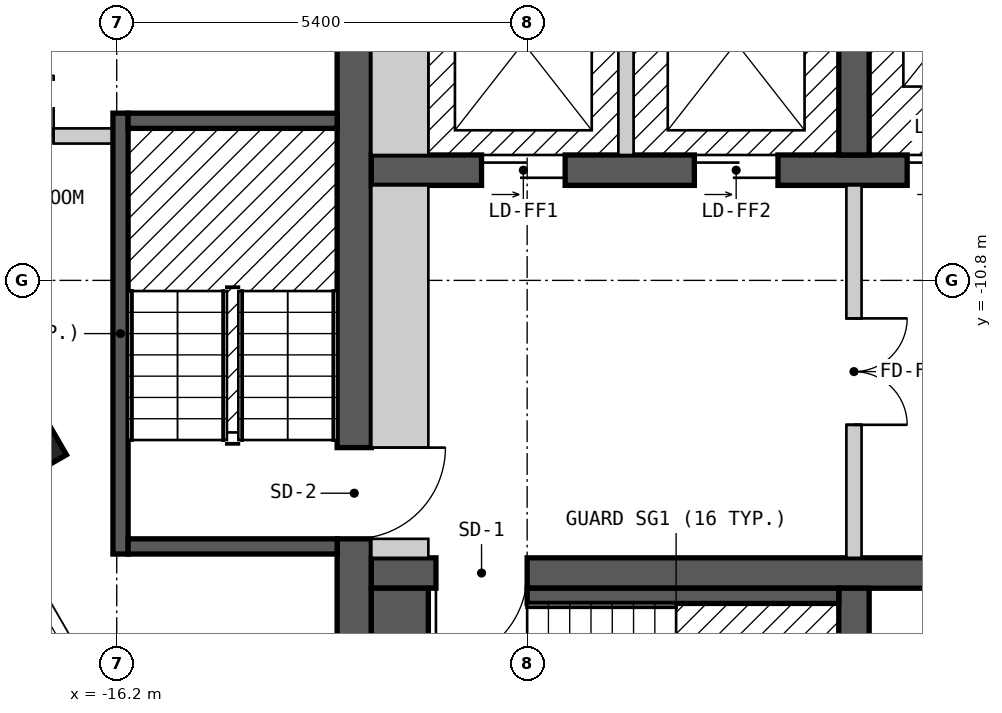
"""IFC4 building model, lengths in metres.
Left out: names, types, materials, properties, quantities, classifications, styles, units other than length and angle.
Written with IfcOpenShell. Run it as: python <this file> out.ifc"""

import sys

from ifc_helpers import new_model, si_unit, direction, frame, frame_2d, origin, origin_2d, place, context, subcontext, project, spatial, polyline, rectangle, outline, extrude, element, fill, save


model = new_model("IFC4")
c1 = context("Model", 3, precision=1e-05, world=origin(), true_north=direction((0.0, 1.0)))
c2 = subcontext(c1, "Body", "Model", "MODEL_VIEW")
j1 = project(units=[si_unit("LENGTHUNIT", "METRE"), si_unit("PLANEANGLEUNIT", "RADIAN")], contexts=[c1])
p1 = place(None, origin())
s1 = spatial("IfcSite", under=j1, at=p1, CompositionType="ELEMENT")
p2 = place(p1, origin())
s2 = spatial("IfcBuilding", under=s1, at=p2, CompositionType="ELEMENT")
p3 = place(p2, frame((0.0, 0.0, 223.8)))
s3 = spatial("IfcBuildingStorey", under=s2, at=p3, CompositionType="ELEMENT", Elevation=223.8)
p4 = place(p3, frame((-17.34, -12.966, 0.0), z_axis=(0.0, 0.0, 1.0), x_axis=(0.499984884929, -0.866034130299, 0.0)))
e1 = element("IfcColumn", 1, at=p4, inside=s3, PredefinedType="COLUMN", context=c2, shape_type="SweptSolid", body=[
    extrude(rectangle(XDim=0.7, YDim=0.7, at=origin_2d()), origin(), (0.0, 0.0, 1.0), 3.0),
])
p5 = place(p3, frame((-13.075, -18.55, 0.0), z_axis=(0.0, 0.0, 1.0), x_axis=(0.0, 1.0, 0.0)))
e2 = element("IfcWall", 2, at=p5, inside=s3, PredefinedType="SHEAR", context=c2, shape_type="SweptSolid", body=[
    extrude(rectangle(XDim=13.1, YDim=0.45, at=frame_2d((6.55, 0.0))), origin(), (0.0, 0.0, 1.0), 2.7),
])
p6 = place(p5, frame((4.35, 0.0, 0.0)))
e3 = element("IfcOpeningElement", 3, at=p6, cuts=e2, PredefinedType="OPENING", context=c2, shape_type="SweptSolid", body=[
    extrude(rectangle(XDim=1.2, YDim=2.1, at=frame_2d((0.6, 1.05))), frame((0.0, 0.235, 0.0), z_axis=(0.0, -1.0, 0.0), x_axis=(1.0, 0.0, 0.0)), (0.0, 0.0, 1.0), 0.47),
])
p7 = place(p3, frame((-12.85, -14.65, 0.0), z_axis=(0.0, 0.0, 1.0), x_axis=(1.0, 0.0, 0.0)))
e4 = element("IfcWall", 4, at=p7, inside=s3, PredefinedType="SHEAR", context=c2, shape_type="SweptSolid", body=[
    extrude(rectangle(XDim=25.7, YDim=0.4, at=frame_2d((12.85, 0.0))), origin(), (0.0, 0.0, 1.0), 2.7),
])
p8 = place(p7, frame((2.05, 0.0, 0.0), z_axis=(0.0, 0.0, 1.0), x_axis=(-1.0, 0.0, 0.0)))
e5 = element("IfcOpeningElement", 5, at=p8, cuts=e4, PredefinedType="OPENING", context=c2, shape_type="SweptSolid", body=[
    extrude(rectangle(XDim=1.2, YDim=2.1, at=frame_2d((0.6, 1.05))), frame((0.0, 0.21, 0.0), z_axis=(0.0, -1.0, 0.0), x_axis=(1.0, 0.0, 0.0)), (0.0, 0.0, 1.0), 0.42),
])
p9 = place(p7, frame((24.9, 0.0, 0.0), z_axis=(0.0, 0.0, 1.0), x_axis=(-1.0, 0.0, 0.0)))
e6 = element("IfcOpeningElement", 6, at=p9, cuts=e4, PredefinedType="OPENING", context=c2, shape_type="SweptSolid", body=[
    extrude(rectangle(XDim=1.2, YDim=2.1, at=frame_2d((0.6, 1.05))), frame((0.0, 0.21, 0.0), z_axis=(0.0, -1.0, 0.0), x_axis=(1.0, 0.0, 0.0)), (0.0, 0.0, 1.0), 0.42),
])
p10 = place(p7, frame((8.75, 0.0, 0.0), z_axis=(0.0, 0.0, 1.0), x_axis=(-1.0, 0.0, 0.0)))
e7 = element("IfcOpeningElement", 7, at=p10, cuts=e4, PredefinedType="OPENING", context=c2, shape_type="SweptSolid", body=[
    extrude(rectangle(XDim=1.0, YDim=2.1, at=frame_2d((0.5, 1.05))), frame((0.0, 0.21, 0.0), z_axis=(0.0, -1.0, 0.0), x_axis=(1.0, 0.0, 0.0)), (0.0, 0.0, 1.0), 0.42),
])
p11 = place(p7, frame((11.5, 0.0, 0.0), z_axis=(0.0, 0.0, 1.0), x_axis=(-1.0, 0.0, 0.0)))
e8 = element("IfcOpeningElement", 8, at=p11, cuts=e4, PredefinedType="OPENING", context=c2, shape_type="SweptSolid", body=[
    extrude(rectangle(XDim=0.9, YDim=2.1, at=frame_2d((0.45, 1.05))), frame((0.0, 0.21, 0.0), z_axis=(0.0, -1.0, 0.0), x_axis=(1.0, 0.0, 0.0)), (0.0, 0.0, 1.0), 0.42),
])
p12 = place(p7, frame((14.3, 0.0, 0.0), z_axis=(0.0, 0.0, 1.0), x_axis=(-1.0, 0.0, 0.0)))
e9 = element("IfcOpeningElement", 9, at=p12, cuts=e4, PredefinedType="OPENING", context=c2, shape_type="SweptSolid", body=[
    extrude(rectangle(XDim=1.0, YDim=2.1, at=frame_2d((0.5, 1.05))), frame((0.0, 0.21, 0.0), z_axis=(0.0, -1.0, 0.0), x_axis=(1.0, 0.0, 0.0)), (0.0, 0.0, 1.0), 0.42),
])
p13 = place(p7, frame((17.9, 0.0, 0.0), z_axis=(0.0, 0.0, 1.0), x_axis=(-1.0, 0.0, 0.0)))
e10 = element("IfcOpeningElement", 10, at=p13, cuts=e4, PredefinedType="OPENING", context=c2, shape_type="SweptSolid", body=[
    extrude(rectangle(XDim=1.0, YDim=2.1, at=frame_2d((0.5, 1.05))), frame((0.0, 0.21, 0.0), z_axis=(0.0, -1.0, 0.0), x_axis=(1.0, 0.0, 0.0)), (0.0, 0.0, 1.0), 0.42),
])
p14 = place(p3, frame((-12.85, -9.35, 0.0), z_axis=(0.0, 0.0, 1.0), x_axis=(1.0, 0.0, 0.0)))
e11 = element("IfcWall", 11, at=p14, inside=s3, PredefinedType="SHEAR", context=c2, shape_type="SweptSolid", body=[
    extrude(rectangle(XDim=23.05, YDim=0.4, at=frame_2d((11.525, 0.0))), origin(), (0.0, 0.0, 1.0), 2.7),
])
p15 = place(p14, frame((1.45, 0.0, 0.0)))
e12 = element("IfcOpeningElement", 12, at=p15, cuts=e11, PredefinedType="OPENING", context=c2, shape_type="SweptSolid", body=[
    extrude(rectangle(XDim=1.1, YDim=2.1, at=frame_2d((0.55, 1.05))), frame((0.0, 0.21, 0.0), z_axis=(0.0, -1.0, 0.0), x_axis=(1.0, 0.0, 0.0)), (0.0, 0.0, 1.0), 0.42),
])
p16 = place(p14, frame((4.25, 0.0, 0.0)))
e13 = element("IfcOpeningElement", 13, at=p16, cuts=e11, PredefinedType="OPENING", context=c2, shape_type="SweptSolid", body=[
    extrude(rectangle(XDim=1.1, YDim=2.1, at=frame_2d((0.55, 1.05))), frame((0.0, 0.21, 0.0), z_axis=(0.0, -1.0, 0.0), x_axis=(1.0, 0.0, 0.0)), (0.0, 0.0, 1.0), 0.42),
])
p17 = place(p14, frame((7.05, 0.0, 0.0)))
e14 = element("IfcOpeningElement", 14, at=p17, cuts=e11, PredefinedType="OPENING", context=c2, shape_type="SweptSolid", body=[
    extrude(rectangle(XDim=1.1, YDim=2.1, at=frame_2d((0.55, 1.05))), frame((0.0, 0.21, 0.0), z_axis=(0.0, -1.0, 0.0), x_axis=(1.0, 0.0, 0.0)), (0.0, 0.0, 1.0), 0.42),
])
p18 = place(p14, frame((9.35, 0.0, 0.0)))
e15 = element("IfcOpeningElement", 15, at=p18, cuts=e11, PredefinedType="OPENING", context=c2, shape_type="SweptSolid", body=[
    extrude(rectangle(XDim=1.1, YDim=2.1, at=frame_2d((0.55, 1.05))), frame((0.0, 0.21, 0.0), z_axis=(0.0, -1.0, 0.0), x_axis=(1.0, 0.0, 0.0)), (0.0, 0.0, 1.0), 0.42),
])
p19 = place(p14, frame((11.65, 0.0, 0.0)))
e16 = element("IfcOpeningElement", 16, at=p19, cuts=e11, PredefinedType="OPENING", context=c2, shape_type="SweptSolid", body=[
    extrude(rectangle(XDim=1.1, YDim=2.1, at=frame_2d((0.55, 1.05))), frame((0.0, 0.21, 0.0), z_axis=(0.0, -1.0, 0.0), x_axis=(1.0, 0.0, 0.0)), (0.0, 0.0, 1.0), 0.42),
])
p20 = place(p14, frame((13.95, 0.0, 0.0)))
e17 = element("IfcOpeningElement", 17, at=p20, cuts=e11, PredefinedType="OPENING", context=c2, shape_type="SweptSolid", body=[
    extrude(rectangle(XDim=1.1, YDim=2.1, at=frame_2d((0.55, 1.05))), frame((0.0, 0.21, 0.0), z_axis=(0.0, -1.0, 0.0), x_axis=(1.0, 0.0, 0.0)), (0.0, 0.0, 1.0), 0.42),
])
p21 = place(p14, frame((16.25, 0.0, 0.0)))
e18 = element("IfcOpeningElement", 18, at=p21, cuts=e11, PredefinedType="OPENING", context=c2, shape_type="SweptSolid", body=[
    extrude(rectangle(XDim=1.1, YDim=2.1, at=frame_2d((0.55, 1.05))), frame((0.0, 0.21, 0.0), z_axis=(0.0, -1.0, 0.0), x_axis=(1.0, 0.0, 0.0)), (0.0, 0.0, 1.0), 0.42),
])
p22 = place(p14, frame((18.55, 0.0, 0.0)))
e19 = element("IfcOpeningElement", 19, at=p22, cuts=e11, PredefinedType="OPENING", context=c2, shape_type="SweptSolid", body=[
    extrude(rectangle(XDim=1.1, YDim=2.1, at=frame_2d((0.55, 1.05))), frame((0.0, 0.21, 0.0), z_axis=(0.0, -1.0, 0.0), x_axis=(1.0, 0.0, 0.0)), (0.0, 0.0, 1.0), 0.42),
])
p23 = place(p14, frame((20.95, 0.0, 0.0)))
e20 = element("IfcOpeningElement", 20, at=p23, cuts=e11, PredefinedType="OPENING", context=c2, shape_type="SweptSolid", body=[
    extrude(rectangle(XDim=1.1, YDim=2.1, at=frame_2d((0.55, 1.05))), frame((0.0, 0.21, 0.0), z_axis=(0.0, -1.0, 0.0), x_axis=(1.0, 0.0, 0.0)), (0.0, 0.0, 1.0), 0.42),
])
for number, where, z_axis, x_axis in (
    (21, (-6.5, -18.55, 0.0), (0.0, 0.0, 1.0), (0.0, 1.0, 0.0)),
    (22, (-6.5, -9.15, 0.0), (0.0, 0.0, 1.0), (0.0, 1.0, 0.0)),
):
    element("IfcWall", number, at=place(p3, frame(where, z_axis=z_axis, x_axis=x_axis)), inside=s3, PredefinedType="SHEAR", context=c2, shape_type="SweptSolid", body=[
        extrude(rectangle(XDim=3.7, YDim=0.4, at=frame_2d((1.85, 0.0))), origin(), (0.0, 0.0, 1.0), 2.7),
    ])
p24 = place(p3, frame((-23.599, -4.025, 0.0), z_axis=(0.0, 0.0, 1.0), x_axis=(0.500012653391, -0.866018098222, 0.0)))
e23 = element("IfcWall", 23, at=p24, inside=s3, PredefinedType="SOLIDWALL", context=c2, shape_type="SweptSolid", body=[
    extrude(outline(polyline([(0.0, -0.15), (16.628, -0.15), (16.548, 0.15), (0.08, 0.15), (0.0, -0.15)])), origin(), (0.0, 0.0, 1.0), 2.7),
])
p25 = place(p24, frame((2.444, 0.0, 0.15)))
e24 = element("IfcOpeningElement", 24, at=p25, cuts=e23, PredefinedType="OPENING", context=c2, shape_type="SweptSolid", body=[
    extrude(rectangle(XDim=1.5, YDim=2.1, at=frame_2d((0.75, 1.05))), frame((0.0, 0.16, 0.0), z_axis=(0.0, -1.0, 0.0), x_axis=(1.0, 0.0, 0.0)), (0.0, 0.0, 1.0), 0.32),
])
p26 = place(p24, frame((7.564, 0.0, 0.15)))
e25 = element("IfcOpeningElement", 25, at=p26, cuts=e23, PredefinedType="OPENING", context=c2, shape_type="SweptSolid", body=[
    extrude(rectangle(XDim=1.5, YDim=2.1, at=frame_2d((0.75, 1.05))), frame((0.0, 0.16, 0.0), z_axis=(0.0, -1.0, 0.0), x_axis=(1.0, 0.0, 0.0)), (0.0, 0.0, 1.0), 0.32),
])
p27 = place(p24, frame((12.682, 0.0, 0.15)))
e26 = element("IfcOpeningElement", 26, at=p27, cuts=e23, PredefinedType="OPENING", context=c2, shape_type="SweptSolid", body=[
    extrude(rectangle(XDim=1.5, YDim=2.1, at=frame_2d((0.75, 1.05))), frame((0.0, 0.16, 0.0), z_axis=(0.0, -1.0, 0.0), x_axis=(1.0, 0.0, 0.0)), (0.0, 0.0, 1.0), 0.32),
])
p28 = place(p3, frame((-18.749, -8.9, 0.0), z_axis=(0.0, 0.0, 1.0), x_axis=(1.0, 0.0, 0.0)))
e27 = element("IfcWall", 27, at=p28, inside=s3, PredefinedType="PARTITIONING", context=c2, shape_type="SweptSolid", body=[
    extrude(rectangle(XDim=2.699, YDim=0.2, at=frame_2d((1.35, 0.0))), origin(), (0.0, 0.0, 1.0), 2.7),
])
p29 = place(p28, frame((0.919, 0.0, 0.0)))
e28 = element("IfcOpeningElement", 28, at=p29, cuts=e27, PredefinedType="OPENING", context=c2, shape_type="SweptSolid", body=[
    extrude(rectangle(XDim=0.8, YDim=2.1, at=frame_2d((0.4, 1.05))), frame((0.0, 0.11, 0.0), z_axis=(0.0, -1.0, 0.0), x_axis=(1.0, 0.0, 0.0)), (0.0, 0.0, 1.0), 0.22),
])
p30 = place(p3, frame((-16.15, -14.4, 0.0), z_axis=(0.0, 0.0, 1.0), x_axis=(0.0, 1.0, 0.0)))
e29 = element("IfcWall", 29, at=p30, inside=s3, PredefinedType="SOLIDWALL", context=c2, shape_type="SweptSolid", body=[
    extrude(rectangle(XDim=5.8, YDim=0.2, at=frame_2d((2.9, 0.0))), origin(), (0.0, 0.0, 1.0), 2.7),
])
for number, where, z_axis, x_axis in (
    (30, (-16.05, -14.3, 0.0), (0.0, 0.0, 1.0), (1.0, 0.0, 0.0)),
    (31, (-16.05, -8.7, 0.0), (0.0, 0.0, 1.0), (1.0, 0.0, 0.0)),
):
    element("IfcWall", number, at=place(p3, frame(where, z_axis=z_axis, x_axis=x_axis)), inside=s3, PredefinedType="SOLIDWALL", context=c2, shape_type="SweptSolid", body=[
        extrude(rectangle(XDim=2.75, YDim=0.2, at=frame_2d((1.375, 0.0))), origin(), (0.0, 0.0, 1.0), 2.7),
    ])
p31 = place(p3, frame((-12.475, -18.55, 0.0), z_axis=(0.0, 0.0, 1.0), x_axis=(0.0, 1.0, 0.0)))
e32 = element("IfcWall", 32, at=p31, inside=s3, PredefinedType="SOLIDWALL", context=c2, shape_type="SweptSolid", body=[
    extrude(rectangle(XDim=3.7, YDim=0.75, at=frame_2d((1.85, 0.0))), origin(), (0.0, 0.0, 1.0), 2.7),
])
p32 = place(p3, frame((-12.85, -14.325, 0.0), z_axis=(0.0, 0.0, 1.0), x_axis=(1.0, 0.0, 0.0)))
e33 = element("IfcWall", 33, at=p32, inside=s3, PredefinedType="PARTITIONING", context=c2, shape_type="SweptSolid", body=[
    extrude(rectangle(XDim=0.75, YDim=0.25, at=frame_2d((0.375, 0.0))), origin(), (0.0, 0.0, 1.0), 2.7),
])
p33 = place(p3, frame((-12.475, -13.0, 0.0), z_axis=(0.0, 0.0, 1.0), x_axis=(0.0, 1.0, 0.0)))
e34 = element("IfcWall", 34, at=p33, inside=s3, PredefinedType="PARTITIONING", context=c2, shape_type="SweptSolid", body=[
    extrude(rectangle(XDim=3.45, YDim=0.75, at=frame_2d((1.725, 0.0))), origin(), (0.0, 0.0, 1.0), 2.7),
])
p34 = place(p3, frame((-12.475, -9.15, 0.0), z_axis=(0.0, 0.0, 1.0), x_axis=(0.0, 1.0, 0.0)))
e35 = element("IfcWall", 35, at=p34, inside=s3, PredefinedType="SOLIDWALL", context=c2, shape_type="SweptSolid", body=[
    extrude(rectangle(XDim=3.7, YDim=0.75, at=frame_2d((1.85, 0.0))), origin(), (0.0, 0.0, 1.0), 2.7),
])
p35 = place(p3, frame((-10.8, -14.95, 0.0), z_axis=(0.0, 0.0, 1.0), x_axis=(1.0, 0.0, 0.0)))
e36 = element("IfcWall", 36, at=p35, inside=s3, PredefinedType="SOLIDWALL", context=c2, shape_type="SweptSolid", body=[
    extrude(rectangle(XDim=4.1, YDim=0.2, at=frame_2d((2.05, 0.0))), origin(), (0.0, 0.0, 1.0), 2.7),
])
p36 = place(p3, frame((-9.5, -9.15, 0.0), z_axis=(0.0, 0.0, 1.0), x_axis=(0.0, 1.0, 0.0)))
e37 = element("IfcWall", 37, at=p36, inside=s3, PredefinedType="SOLIDWALL", context=c2, shape_type="SweptSolid", body=[
    extrude(rectangle(XDim=2.95, YDim=0.2, at=frame_2d((1.475, 0.0))), origin(), (0.0, 0.0, 1.0), 2.7),
])
p37 = place(p3, frame((-6.5, -14.45, 0.0), z_axis=(0.0, 0.0, 1.0), x_axis=(0.0, 1.0, 0.0)))
e38 = element("IfcWall", 38, at=p37, inside=s3, PredefinedType="PARTITIONING", context=c2, shape_type="SweptSolid", body=[
    extrude(rectangle(XDim=4.9, YDim=0.2, at=frame_2d((2.45, 0.0))), origin(), (0.0, 0.0, 1.0), 2.7),
])
p38 = place(p37, frame((3.15, 0.0, 0.0), z_axis=(0.0, 0.0, 1.0), x_axis=(-1.0, 0.0, 0.0)))
e39 = element("IfcOpeningElement", 39, at=p38, cuts=e38, PredefinedType="OPENING", context=c2, shape_type="SweptSolid", body=[
    extrude(rectangle(XDim=1.4, YDim=2.1, at=frame_2d((0.7, 1.05))), frame((0.0, 0.11, 0.0), z_axis=(0.0, -1.0, 0.0), x_axis=(1.0, 0.0, 0.0)), (0.0, 0.0, 1.0), 0.22),
])
p39 = place(p27, origin())
e40 = element("IfcWindow", 40, at=p39, inside=s3, PartitioningType="SINGLE_PANEL", PredefinedType="WINDOW", context=c2, shape_type="SweptSolid", body=[
    extrude(rectangle(XDim=1.5, YDim=2.1, at=frame_2d((0.75, 1.05))), frame((0.0, 0.03, 0.0), z_axis=(0.0, -1.0, 0.0), x_axis=(1.0, 0.0, 0.0)), (0.0, 0.0, 1.0), 0.06),
])
fill(e26, e40)
p40 = place(p29, origin())
e41 = element("IfcDoor", 41, at=p40, inside=s3, OperationType="SINGLE_SWING_RIGHT", PredefinedType="DOOR", context=c2, shape_type="SweptSolid", body=[
    extrude(rectangle(XDim=0.8, YDim=2.1, at=frame_2d((0.4, 1.05))), frame((0.0, 0.025, 0.0), z_axis=(0.0, -1.0, 0.0), x_axis=(1.0, 0.0, 0.0)), (0.0, 0.0, 1.0), 0.05),
])
fill(e28, e41)
p41 = place(p15, origin())
e42 = element("IfcDoor", 42, at=p41, inside=s3, OperationType="DOUBLE_DOOR_SLIDING", PredefinedType="DOOR", context=c2, shape_type="SweptSolid", body=[
    extrude(rectangle(XDim=1.1, YDim=2.1, at=frame_2d((0.55, 1.05))), frame((0.0, 0.025, 0.0), z_axis=(0.0, -1.0, 0.0), x_axis=(1.0, 0.0, 0.0)), (0.0, 0.0, 1.0), 0.05),
])
fill(e12, e42)
p42 = place(p16, origin())
e43 = element("IfcDoor", 43, at=p42, inside=s3, OperationType="DOUBLE_DOOR_SLIDING", PredefinedType="DOOR", context=c2, shape_type="SweptSolid", body=[
    extrude(rectangle(XDim=1.1, YDim=2.1, at=frame_2d((0.55, 1.05))), frame((0.0, 0.025, 0.0), z_axis=(0.0, -1.0, 0.0), x_axis=(1.0, 0.0, 0.0)), (0.0, 0.0, 1.0), 0.05),
])
fill(e13, e43)
p43 = place(p17, origin())
e44 = element("IfcDoor", 44, at=p43, inside=s3, OperationType="DOUBLE_DOOR_SLIDING", PredefinedType="DOOR", context=c2, shape_type="SweptSolid", body=[
    extrude(rectangle(XDim=1.1, YDim=2.1, at=frame_2d((0.55, 1.05))), frame((0.0, 0.025, 0.0), z_axis=(0.0, -1.0, 0.0), x_axis=(1.0, 0.0, 0.0)), (0.0, 0.0, 1.0), 0.05),
])
fill(e14, e44)
p44 = place(p8, origin())
e45 = element("IfcDoor", 45, at=p44, inside=s3, OperationType="SINGLE_SWING_RIGHT", PredefinedType="DOOR", context=c2, shape_type="SweptSolid", body=[
    extrude(rectangle(XDim=1.2, YDim=2.1, at=frame_2d((0.6, 1.05))), frame((0.0, 0.025, 0.0), z_axis=(0.0, -1.0, 0.0), x_axis=(1.0, 0.0, 0.0)), (0.0, 0.0, 1.0), 0.05),
])
fill(e5, e45)
p45 = place(p6, origin())
e46 = element("IfcDoor", 46, at=p45, inside=s3, OperationType="SINGLE_SWING_RIGHT", PredefinedType="DOOR", context=c2, shape_type="SweptSolid", body=[
    extrude(rectangle(XDim=1.2, YDim=2.1, at=frame_2d((0.6, 1.05))), frame((0.0, 0.025, 0.0), z_axis=(0.0, -1.0, 0.0), x_axis=(1.0, 0.0, 0.0)), (0.0, 0.0, 1.0), 0.05),
])
fill(e3, e46)
p46 = place(p38, origin())
e47 = element("IfcDoor", 47, at=p46, inside=s3, OperationType="DOUBLE_DOOR_SINGLE_SWING", PredefinedType="DOOR", context=c2, shape_type="SweptSolid", body=[
    extrude(rectangle(XDim=1.4, YDim=2.1, at=frame_2d((0.7, 1.05))), frame((0.0, 0.025, 0.0), z_axis=(0.0, -1.0, 0.0), x_axis=(1.0, 0.0, 0.0)), (0.0, 0.0, 1.0), 0.05),
])
fill(e39, e47)
save(model, sys.argv[1])
